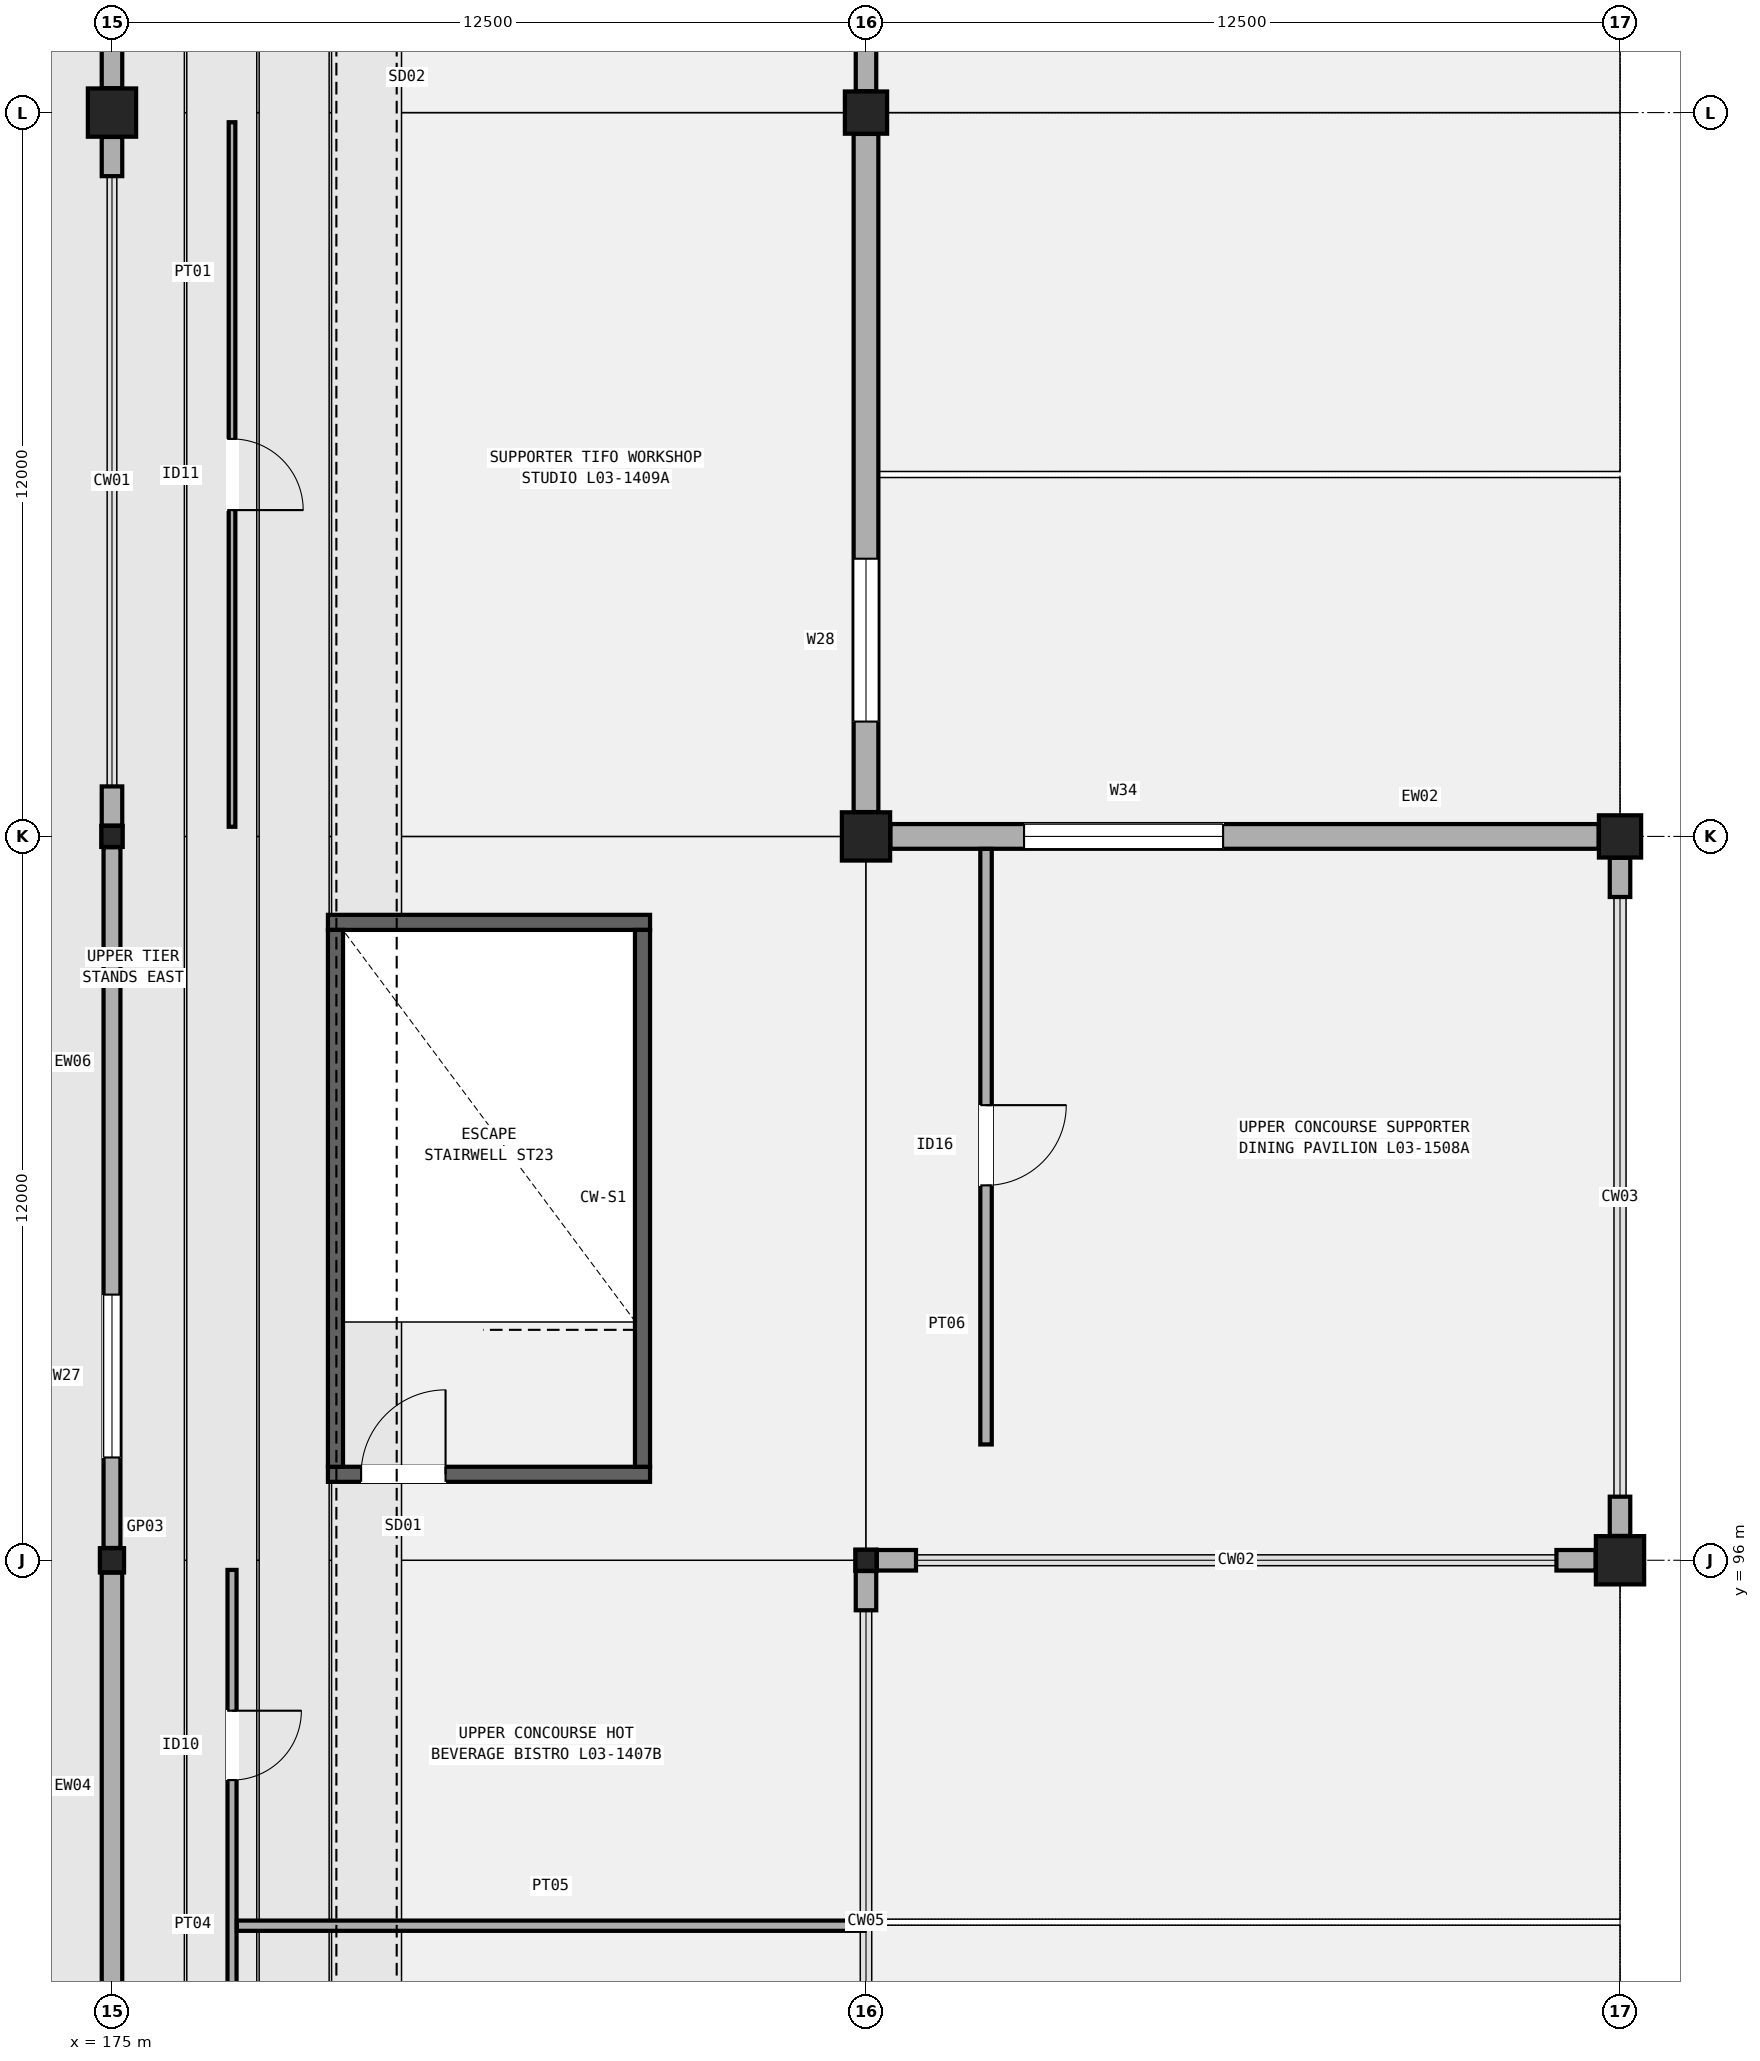
"""IFC4 building model, lengths in metres.
Left out: names, types, materials, properties, quantities, classifications, styles, units other than length and angle.
Written with IfcOpenShell. Run it as: python <this file> out.ifc"""

import sys

from ifc_helpers import new_model, si_unit, direction, frame, frame_2d, origin, origin_2d, place, context, subcontext, project, spatial, rectangle, hollow_rectangle, extrude, element, fill, save


model = new_model("IFC4")
c1 = context("Model", 3, precision=1e-05, world=origin(), true_north=direction((0.0, 1.0)))
c2 = subcontext(c1, "Body", "Model", "MODEL_VIEW")
j1 = project(units=[si_unit("LENGTHUNIT", "METRE"), si_unit("PLANEANGLEUNIT", "RADIAN")], contexts=[c1])
p1 = place(None, origin())
s1 = spatial("IfcSite", under=j1, at=p1, CompositionType="ELEMENT")
p2 = place(p1, origin())
s2 = spatial("IfcBuilding", under=s1, at=p2, CompositionType="ELEMENT")
p3 = place(p2, frame((0.0, 0.0, 15.3)))
s3 = spatial("IfcBuildingStorey", under=s2, at=p3, CompositionType="ELEMENT", Elevation=15.3)
p4 = place(p3, frame((175.0, 96.0, 0.0), z_axis=(0.0, 0.0, 1.0), x_axis=(1.0, 0.0, 0.0)))
e1 = element("IfcColumn", 1, at=p4, inside=s3, PredefinedType="COLUMN", context=c2, shape_type="SweptSolid", body=[
    extrude(hollow_rectangle(XDim=0.4, YDim=0.4, WallThickness=0.016, InnerFilletRadius=0.016, OuterFilletRadius=0.032, at=origin_2d()), origin(), (0.0, 0.0, 1.0), 5.1),
])
p5 = place(p3, frame((175.0, 108.0, 0.0), z_axis=(0.0, 0.0, 1.0), x_axis=(1.0, 0.0, 0.0)))
e2 = element("IfcColumn", 2, at=p5, inside=s3, PredefinedType="COLUMN", context=c2, shape_type="SweptSolid", body=[
    extrude(hollow_rectangle(XDim=0.35, YDim=0.35, WallThickness=0.016, InnerFilletRadius=0.016, OuterFilletRadius=0.032, at=origin_2d()), origin(), (0.0, 0.0, 1.0), 5.1),
])
p6 = place(p3, frame((175.0, 120.0, 0.0), z_axis=(0.0, 0.0, 1.0), x_axis=(1.0, 0.0, 0.0)))
e3 = element("IfcColumn", 3, at=p6, inside=s3, PredefinedType="COLUMN", context=c2, shape_type="SweptSolid", body=[
    extrude(rectangle(XDim=0.8, YDim=0.8, at=origin_2d()), origin(), (0.0, 0.0, 1.0), 5.1),
])
p7 = place(p3, frame((187.5, 96.0, 0.0), z_axis=(0.0, 0.0, 1.0), x_axis=(1.0, 0.0, 0.0)))
e4 = element("IfcColumn", 4, at=p7, inside=s3, PredefinedType="COLUMN", context=c2, shape_type="SweptSolid", body=[
    extrude(hollow_rectangle(XDim=0.35, YDim=0.35, WallThickness=0.016, InnerFilletRadius=0.016, OuterFilletRadius=0.032, at=origin_2d()), origin(), (0.0, 0.0, 1.0), 5.1),
])
p8 = place(p3, frame((187.5, 108.0, 0.0), z_axis=(0.0, 0.0, 1.0), x_axis=(1.0, 0.0, 0.0)))
e5 = element("IfcColumn", 5, at=p8, inside=s3, PredefinedType="COLUMN", context=c2, shape_type="SweptSolid", body=[
    extrude(rectangle(XDim=0.8, YDim=0.8, at=origin_2d()), origin(), (0.0, 0.0, 1.0), 5.1),
])
p9 = place(p3, frame((187.5, 120.0, 0.0), z_axis=(0.0, 0.0, 1.0), x_axis=(1.0, 0.0, 0.0)))
e6 = element("IfcColumn", 6, at=p9, inside=s3, PredefinedType="COLUMN", context=c2, shape_type="SweptSolid", body=[
    extrude(rectangle(XDim=0.7, YDim=0.7, at=origin_2d()), origin(), (0.0, 0.0, 1.0), 5.1),
])
p10 = place(p3, frame((200.0, 96.0, 0.0), z_axis=(0.0, 0.0, 1.0), x_axis=(1.0, 0.0, 0.0)))
e7 = element("IfcColumn", 7, at=p10, inside=s3, PredefinedType="COLUMN", context=c2, shape_type="SweptSolid", body=[
    extrude(rectangle(XDim=0.8, YDim=0.8, at=origin_2d()), origin(), (0.0, 0.0, 1.0), 5.1),
])
p11 = place(p3, frame((200.0, 108.0, 0.0), z_axis=(0.0, 0.0, 1.0), x_axis=(1.0, 0.0, 0.0)))
e8 = element("IfcColumn", 8, at=p11, inside=s3, PredefinedType="COLUMN", context=c2, shape_type="SweptSolid", body=[
    extrude(rectangle(XDim=0.7, YDim=0.7, at=origin_2d()), origin(), (0.0, 0.0, 1.0), 5.1),
])
p12 = place(p3, frame((175.0, 84.354, 0.0), z_axis=(0.0, 0.0, 1.0), x_axis=(0.0, 1.0, 0.0)))
e9 = element("IfcWall", 9, at=p12, inside=s3, PredefinedType="SOLIDWALL", context=c2, shape_type="SweptSolid", body=[
    extrude(rectangle(XDim=11.442, YDim=0.34, at=frame_2d((5.721, 0.0))), origin(), (0.0, 0.0, 1.0), 4.06),
])
p13 = place(p12, frame((1.5, 0.0, 0.95)))
e10 = element("IfcOpeningElement", 10, at=p13, cuts=e9, PredefinedType="OPENING", context=c2, shape_type="SweptSolid", body=[
    extrude(rectangle(XDim=2.55, YDim=1.95, at=frame_2d((1.275, 0.975))), frame((0.0, 0.18, 0.0), z_axis=(0.0, -1.0, 0.0), x_axis=(1.0, 0.0, 0.0)), (0.0, 0.0, 1.0), 0.36),
])
p14 = place(p3, frame((187.5, 95.171, 0.0), z_axis=(0.0, 0.0, 1.0), x_axis=(0.0, 1.0, 0.0)))
e11 = element("IfcWall", 11, at=p14, inside=s3, PredefinedType="SOLIDWALL", context=c2, shape_type="SweptSolid", body=[
    extrude(rectangle(XDim=0.65, YDim=0.34, at=frame_2d((0.325, 0.0))), origin(), (0.0, 0.0, 1.0), 4.16),
])
p15 = place(p3, frame((175.0, 96.204, 0.0), z_axis=(0.0, 0.0, 1.0), x_axis=(0.0, 1.0, 0.0)))
e12 = element("IfcWall", 12, at=p15, inside=s3, PredefinedType="SOLIDWALL", context=c2, shape_type="SweptSolid", body=[
    extrude(rectangle(XDim=11.617, YDim=0.28, at=frame_2d((5.809, 0.0))), origin(), (0.0, 0.0, 1.0), 4.16),
])
p16 = place(p15, frame((1.5, 0.0, 0.95)))
e13 = element("IfcOpeningElement", 13, at=p16, cuts=e12, PredefinedType="OPENING", context=c2, shape_type="SweptSolid", body=[
    extrude(rectangle(XDim=2.7, YDim=1.75, at=frame_2d((1.35, 0.875))), frame((0.0, 0.15, 0.0), z_axis=(0.0, -1.0, 0.0), x_axis=(1.0, 0.0, 0.0)), (0.0, 0.0, 1.0), 0.3),
])
p17 = place(p3, frame((175.0, 108.179, 0.0), z_axis=(0.0, 0.0, 1.0), x_axis=(0.0, 1.0, 0.0)))
e14 = element("IfcWall", 14, at=p17, inside=s3, PredefinedType="SOLIDWALL", context=c2, shape_type="SweptSolid", body=[
    extrude(rectangle(XDim=0.65, YDim=0.34, at=frame_2d((0.325, 0.0))), origin(), (0.0, 0.0, 1.0), 4.172),
])
p18 = place(p3, frame((175.0, 118.946, 0.0), z_axis=(0.0, 0.0, 1.0), x_axis=(0.0, 1.0, 0.0)))
e15 = element("IfcWall", 15, at=p18, inside=s3, PredefinedType="SOLIDWALL", context=c2, shape_type="SweptSolid", body=[
    extrude(rectangle(XDim=0.65, YDim=0.34, at=frame_2d((0.325, 0.0))), origin(), (0.0, 0.0, 1.0), 4.172),
])
p19 = place(p3, frame((187.5, 108.404, 0.0), z_axis=(0.0, 0.0, 1.0), x_axis=(0.0, 1.0, 0.0)))
e16 = element("IfcWall", 16, at=p19, inside=s3, PredefinedType="SOLIDWALL", context=c2, shape_type="SweptSolid", body=[
    extrude(rectangle(XDim=11.242, YDim=0.41, at=frame_2d((5.621, 0.0))), origin(), (0.0, 0.0, 1.0), 4.06),
])
p20 = place(p19, frame((1.5, 0.0, 0.95)))
e17 = element("IfcOpeningElement", 17, at=p20, cuts=e16, PredefinedType="OPENING", context=c2, shape_type="SweptSolid", body=[
    extrude(rectangle(XDim=2.7, YDim=2.2, at=frame_2d((1.35, 1.1))), frame((0.0, 0.215, 0.0), z_axis=(0.0, -1.0, 0.0), x_axis=(1.0, 0.0, 0.0)), (0.0, 0.0, 1.0), 0.43),
])
p21 = place(p3, frame((175.0, 120.404, 0.0), z_axis=(0.0, 0.0, 1.0), x_axis=(0.0, 1.0, 0.0)))
e18 = element("IfcWall", 18, at=p21, inside=s3, PredefinedType="SOLIDWALL", context=c2, shape_type="SweptSolid", body=[
    extrude(rectangle(XDim=0.65, YDim=0.34, at=frame_2d((0.325, 0.0))), origin(), (0.0, 0.0, 1.0), 4.06),
])
p22 = place(p3, frame((187.5, 120.354, 0.0), z_axis=(0.0, 0.0, 1.0), x_axis=(0.0, 1.0, 0.0)))
e19 = element("IfcWall", 19, at=p22, inside=s3, PredefinedType="SOLIDWALL", context=c2, shape_type="SweptSolid", body=[
    extrude(rectangle(XDim=11.442, YDim=0.34, at=frame_2d((5.721, 0.0))), origin(), (0.0, 0.0, 1.0), 4.16),
])
p23 = place(p22, frame((1.5, 0.0, 0.95)))
e20 = element("IfcOpeningElement", 20, at=p23, cuts=e19, PredefinedType="OPENING", context=c2, shape_type="SweptSolid", body=[
    extrude(rectangle(XDim=2.85, YDim=2.0, at=frame_2d((1.425, 1.0))), frame((0.0, 0.18, 0.0), z_axis=(0.0, -1.0, 0.0), x_axis=(1.0, 0.0, 0.0)), (0.0, 0.0, 1.0), 0.36),
])
p24 = place(p3, frame((187.679, 96.0, 0.0), z_axis=(0.0, 0.0, 1.0), x_axis=(1.0, 0.0, 0.0)))
e21 = element("IfcWall", 21, at=p24, inside=s3, PredefinedType="SOLIDWALL", context=c2, shape_type="SweptSolid", body=[
    extrude(rectangle(XDim=0.65, YDim=0.34, at=frame_2d((0.325, 0.0))), origin(), (0.0, 0.0, 1.0), 4.172),
])
p25 = place(p3, frame((198.946, 96.0, 0.0), z_axis=(0.0, 0.0, 1.0), x_axis=(1.0, 0.0, 0.0)))
e22 = element("IfcWall", 22, at=p25, inside=s3, PredefinedType="SOLIDWALL", context=c2, shape_type="SweptSolid", body=[
    extrude(rectangle(XDim=0.65, YDim=0.34, at=frame_2d((0.325, 0.0))), origin(), (0.0, 0.0, 1.0), 4.172),
])
p26 = place(p3, frame((187.904, 108.0, 0.0), z_axis=(0.0, 0.0, 1.0), x_axis=(1.0, 0.0, 0.0)))
e23 = element("IfcWall", 23, at=p26, inside=s3, PredefinedType="SOLIDWALL", context=c2, shape_type="SweptSolid", body=[
    extrude(rectangle(XDim=11.742, YDim=0.41, at=frame_2d((5.871, 0.0))), origin(), (0.0, 0.0, 1.0), 4.06),
])
p27 = place(p26, frame((2.216, 0.0, 0.95)))
e24 = element("IfcOpeningElement", 24, at=p27, cuts=e23, PredefinedType="OPENING", context=c2, shape_type="SweptSolid", body=[
    extrude(rectangle(XDim=3.3, YDim=2.25, at=frame_2d((1.65, 1.125))), frame((0.0, 0.215, 0.0), z_axis=(0.0, -1.0, 0.0), x_axis=(1.0, 0.0, 0.0)), (0.0, 0.0, 1.0), 0.43),
])
for number, where, z_axis, x_axis in (
    (25, (200.0, 96.404, 0.0), (0.0, 0.0, 1.0), (0.0, 1.0, 0.0)),
    (26, (200.0, 106.996, 0.0), (0.0, 0.0, 1.0), (0.0, 1.0, 0.0)),
):
    element("IfcWall", number, at=place(p3, frame(where, z_axis=z_axis, x_axis=x_axis)), inside=s3, PredefinedType="SOLIDWALL", context=c2, shape_type="SweptSolid", body=[
        extrude(rectangle(XDim=0.65, YDim=0.34, at=frame_2d((0.325, 0.0))), origin(), (0.0, 0.0, 1.0), 4.06),
    ])
p28 = place(p3, frame((178.58, 97.425, 0.0), z_axis=(0.0, 0.0, 1.0), x_axis=(1.0, 0.0, 0.0)))
e27 = element("IfcWall", 27, at=p28, inside=s3, PredefinedType="SHEAR", context=c2, shape_type="SweptSolid", body=[
    extrude(rectangle(XDim=5.34, YDim=0.25, at=frame_2d((2.67, 0.0))), origin(), (0.0, 0.0, 1.0), 4.86),
])
p29 = place(p28, frame((0.55, 0.0, 0.0)))
e28 = element("IfcOpeningElement", 28, at=p29, cuts=e27, PredefinedType="OPENING", context=c2, shape_type="SweptSolid", body=[
    extrude(rectangle(XDim=1.4, YDim=2.15, at=frame_2d((0.7, 1.075))), frame((0.0, 0.135, 0.0), z_axis=(0.0, -1.0, 0.0), x_axis=(1.0, 0.0, 0.0)), (0.0, 0.0, 1.0), 0.27),
])
p30 = place(p3, frame((178.58, 106.575, 0.0), z_axis=(0.0, 0.0, 1.0), x_axis=(1.0, 0.0, 0.0)))
e29 = element("IfcWall", 29, at=p30, inside=s3, PredefinedType="SHEAR", context=c2, shape_type="SweptSolid", body=[
    extrude(rectangle(XDim=5.34, YDim=0.25, at=frame_2d((2.67, 0.0))), origin(), (0.0, 0.0, 1.0), 4.86),
])
for number, where, z_axis, x_axis in (
    (30, (178.705, 97.55, 0.0), (0.0, 0.0, 1.0), (0.0, 1.0, 0.0)),
    (31, (183.795, 97.55, 0.0), (0.0, 0.0, 1.0), (0.0, 1.0, 0.0)),
):
    element("IfcWall", number, at=place(p3, frame(where, z_axis=z_axis, x_axis=x_axis)), inside=s3, PredefinedType="SHEAR", context=c2, shape_type="SweptSolid", body=[
        extrude(rectangle(XDim=8.9, YDim=0.25, at=frame_2d((4.45, 0.0))), origin(), (0.0, 0.0, 1.0), 4.86),
    ])
p31 = place(p3, frame((176.99, 84.16, 0.0), z_axis=(0.0, 0.0, 1.0), x_axis=(0.0, 1.0, 0.0)))
e32 = element("IfcWall", 32, at=p31, inside=s3, PredefinedType="PARTITIONING", context=c2, shape_type="SweptSolid", body=[
    extrude(rectangle(XDim=11.68, YDim=0.15, at=frame_2d((5.84, 0.0))), origin(), (0.0, 0.0, 1.0), 2.77),
])
p32 = place(p31, frame((3.411, 0.0, 0.0), z_axis=(0.0, 0.0, 1.0), x_axis=(-1.0, 0.0, 0.0)))
e33 = element("IfcOpeningElement", 33, at=p32, cuts=e32, PredefinedType="OPENING", context=c2, shape_type="SweptSolid", body=[
    extrude(rectangle(XDim=1.12, YDim=2.18, at=frame_2d((0.56, 1.09))), frame((0.0, 0.085, 0.0), z_axis=(0.0, -1.0, 0.0), x_axis=(1.0, 0.0, 0.0)), (0.0, 0.0, 1.0), 0.17),
])
p33 = place(p31, frame((9.346, 0.0, 0.0), z_axis=(0.0, 0.0, 1.0), x_axis=(-1.0, 0.0, 0.0)))
e34 = element("IfcOpeningElement", 34, at=p33, cuts=e32, PredefinedType="OPENING", context=c2, shape_type="SweptSolid", body=[
    extrude(rectangle(XDim=1.15, YDim=2.15, at=frame_2d((0.575, 1.075))), frame((0.0, 0.085, 0.0), z_axis=(0.0, -1.0, 0.0), x_axis=(1.0, 0.0, 0.0)), (0.0, 0.0, 1.0), 0.17),
])
p34 = place(p3, frame((177.07, 89.942, 0.0), z_axis=(0.0, 0.0, 1.0), x_axis=(1.0, 0.0, 0.0)))
e35 = element("IfcWall", 35, at=p34, inside=s3, PredefinedType="PARTITIONING", context=c2, shape_type="SweptSolid", body=[
    extrude(rectangle(XDim=10.406, YDim=0.17, at=frame_2d((5.203, 0.0))), origin(), (0.0, 0.0, 1.0), 2.77),
])
p35 = place(p3, frame((176.99, 108.16, 0.0), z_axis=(0.0, 0.0, 1.0), x_axis=(0.0, 1.0, 0.0)))
e36 = element("IfcWall", 36, at=p35, inside=s3, PredefinedType="PARTITIONING", context=c2, shape_type="SweptSolid", body=[
    extrude(rectangle(XDim=11.68, YDim=0.11, at=frame_2d((5.84, 0.0))), origin(), (0.0, 0.0, 1.0), 2.77),
])
p36 = place(p35, frame((6.43, 0.0, 0.0), z_axis=(0.0, 0.0, 1.0), x_axis=(-1.0, 0.0, 0.0)))
e37 = element("IfcOpeningElement", 37, at=p36, cuts=e36, PredefinedType="OPENING", context=c2, shape_type="SweptSolid", body=[
    extrude(rectangle(XDim=1.18, YDim=2.2, at=frame_2d((0.59, 1.1))), frame((0.0, 0.065, 0.0), z_axis=(0.0, -1.0, 0.0), x_axis=(1.0, 0.0, 0.0)), (0.0, 0.0, 1.0), 0.13),
])
p37 = place(p3, frame((189.49, 97.92, 0.0), z_axis=(0.0, 0.0, 1.0), x_axis=(0.0, 1.0, 0.0)))
e38 = element("IfcWall", 38, at=p37, inside=s3, PredefinedType="PARTITIONING", context=c2, shape_type="SweptSolid", body=[
    extrude(rectangle(XDim=9.873, YDim=0.19, at=frame_2d((4.937, 0.0))), origin(), (0.0, 0.0, 1.0), 4.22),
])
p38 = place(p37, frame((5.625, 0.0, 0.0), z_axis=(0.0, 0.0, 1.0), x_axis=(-1.0, 0.0, 0.0)))
e39 = element("IfcOpeningElement", 39, at=p38, cuts=e38, PredefinedType="OPENING", context=c2, shape_type="SweptSolid", body=[
    extrude(rectangle(XDim=1.33, YDim=2.22, at=frame_2d((0.665, 1.11))), frame((0.0, 0.105, 0.0), z_axis=(0.0, -1.0, 0.0), x_axis=(1.0, 0.0, 0.0)), (0.0, 0.0, 1.0), 0.21),
])
p39 = place(p16, origin())
e40 = element("IfcWindow", 40, at=p39, inside=s3, PartitioningType="SINGLE_PANEL", PredefinedType="WINDOW", context=c2, shape_type="SweptSolid", body=[
    extrude(rectangle(XDim=2.7, YDim=1.75, at=frame_2d((1.35, 0.875))), frame((0.0, 0.03, 0.0), z_axis=(0.0, -1.0, 0.0), x_axis=(1.0, 0.0, 0.0)), (0.0, 0.0, 1.0), 0.06),
])
fill(e13, e40)
p40 = place(p20, origin())
e41 = element("IfcWindow", 41, at=p40, inside=s3, PartitioningType="SINGLE_PANEL", PredefinedType="WINDOW", context=c2, shape_type="SweptSolid", body=[
    extrude(rectangle(XDim=2.7, YDim=2.2, at=frame_2d((1.35, 1.1))), frame((0.0, 0.03, 0.0), z_axis=(0.0, -1.0, 0.0), x_axis=(1.0, 0.0, 0.0)), (0.0, 0.0, 1.0), 0.06),
])
fill(e17, e41)
p41 = place(p27, origin())
e42 = element("IfcWindow", 42, at=p41, inside=s3, PartitioningType="SINGLE_PANEL", PredefinedType="WINDOW", context=c2, shape_type="SweptSolid", body=[
    extrude(rectangle(XDim=3.3, YDim=2.25, at=frame_2d((1.65, 1.125))), frame((0.0, 0.03, 0.0), z_axis=(0.0, -1.0, 0.0), x_axis=(1.0, 0.0, 0.0)), (0.0, 0.0, 1.0), 0.06),
])
fill(e24, e42)
p42 = place(p29, origin())
e43 = element("IfcDoor", 43, at=p42, inside=s3, OperationType="SINGLE_SWING_RIGHT", PredefinedType="DOOR", context=c2, shape_type="SweptSolid", body=[
    extrude(rectangle(XDim=1.4, YDim=2.15, at=frame_2d((0.7, 1.075))), frame((0.0, 0.025, 0.0), z_axis=(0.0, -1.0, 0.0), x_axis=(1.0, 0.0, 0.0)), (0.0, 0.0, 1.0), 0.05),
])
fill(e28, e43)
p43 = place(p33, origin())
e44 = element("IfcDoor", 44, at=p43, inside=s3, OperationType="SINGLE_SWING_LEFT", PredefinedType="DOOR", context=c2, shape_type="SweptSolid", body=[
    extrude(rectangle(XDim=1.15, YDim=2.15, at=frame_2d((0.575, 1.075))), frame((0.0, 0.025, 0.0), z_axis=(0.0, -1.0, 0.0), x_axis=(1.0, 0.0, 0.0)), (0.0, 0.0, 1.0), 0.05),
])
fill(e34, e44)
p44 = place(p36, origin())
e45 = element("IfcDoor", 45, at=p44, inside=s3, OperationType="SINGLE_SWING_RIGHT", PredefinedType="DOOR", context=c2, shape_type="SweptSolid", body=[
    extrude(rectangle(XDim=1.18, YDim=2.2, at=frame_2d((0.59, 1.1))), frame((0.0, 0.025, 0.0), z_axis=(0.0, -1.0, 0.0), x_axis=(1.0, 0.0, 0.0)), (0.0, 0.0, 1.0), 0.05),
])
fill(e37, e45)
p45 = place(p38, origin())
e46 = element("IfcDoor", 46, at=p45, inside=s3, OperationType="SINGLE_SWING_LEFT", PredefinedType="DOOR", context=c2, shape_type="SweptSolid", body=[
    extrude(rectangle(XDim=1.33, YDim=2.22, at=frame_2d((0.665, 1.11))), frame((0.0, 0.025, 0.0), z_axis=(0.0, -1.0, 0.0), x_axis=(1.0, 0.0, 0.0)), (0.0, 0.0, 1.0), 0.05),
])
fill(e39, e46)
save(model, sys.argv[1])
